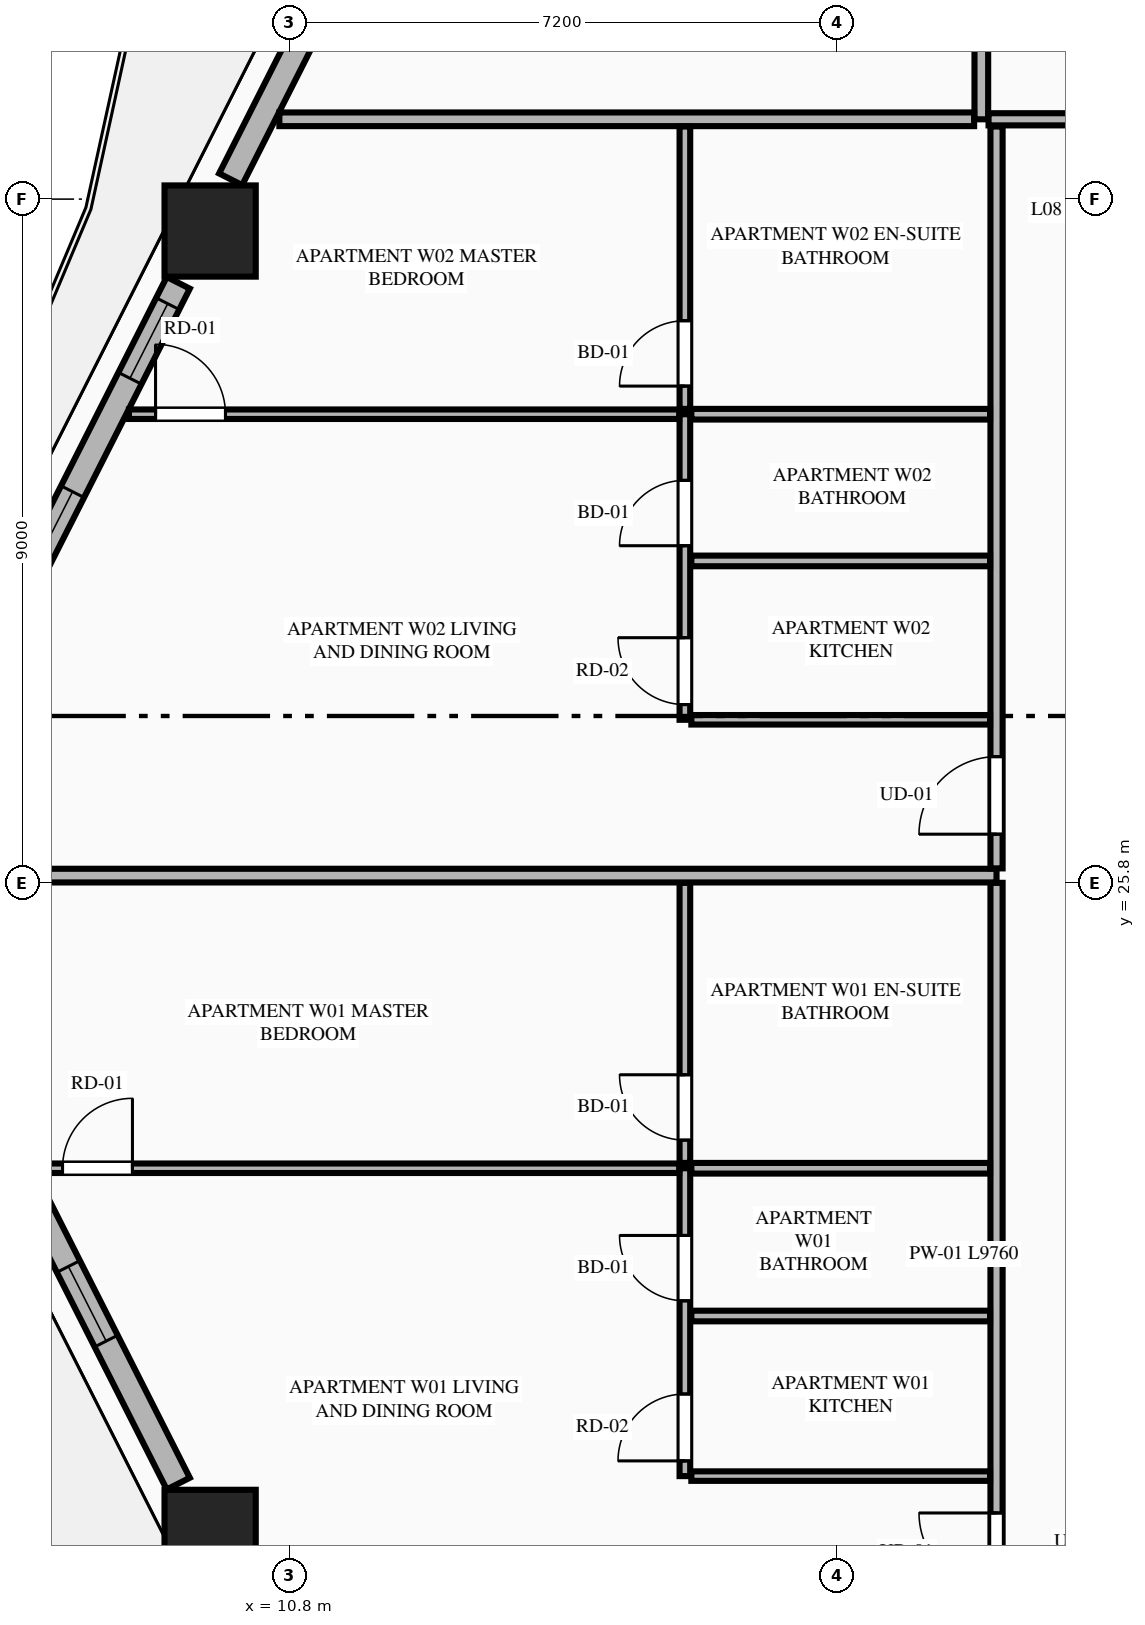
"""IFC4 building model, lengths in metres.
Left out: names, types, materials, properties, quantities, classifications, styles, units other than length and angle.
Written with IfcOpenShell. Run it as: python <this file> out.ifc"""

import sys

from ifc_helpers import new_model, si_unit, direction, frame, frame_2d, origin, origin_2d, place, context, subcontext, project, spatial, rectangle, extrude, element, fill, save


model = new_model("IFC4")
c1 = context("Model", 3, precision=1e-05, world=origin(), true_north=direction((0.0, 1.0)))
c2 = subcontext(c1, "Body", "Model", "MODEL_VIEW")
j1 = project(units=[si_unit("LENGTHUNIT", "METRE"), si_unit("PLANEANGLEUNIT", "RADIAN")], contexts=[c1])
p1 = place(None, origin())
s1 = spatial("IfcSite", under=j1, at=p1, CompositionType="ELEMENT")
p2 = place(p1, origin())
s2 = spatial("IfcBuilding", under=s1, at=p2, CompositionType="ELEMENT")
p3 = place(p2, frame((0.0, 0.0, 35.55)))
s3 = spatial("IfcBuildingStorey", under=s2, at=p3, CompositionType="ELEMENT", Elevation=35.55)
for number, where, z_axis, x_axis in (
    (1, (9.754, 34.38, 0.0), (0.0, 0.0, 1.0), (1.0, 0.0, 0.0)),
    (2, (9.754, 17.22, 0.0), (0.0, 0.0, 1.0), (1.0, 0.0, 0.0)),
):
    element("IfcColumn", number, at=place(p3, frame(where, z_axis=z_axis, x_axis=x_axis)), inside=s3, PredefinedType="COLUMN", context=c2, shape_type="SweptSolid", body=[
        extrude(rectangle(XDim=1.2, YDim=1.2, at=origin_2d()), origin(), (0.0, 0.0, 1.0), 3.55),
    ])
p4 = place(p3, frame((12.529, 40.01, 0.0), z_axis=(0.0, 0.0, 1.0), x_axis=(-0.451627137896, -0.892206774417, 0.0)))
e3 = element("IfcWall", 3, at=p4, inside=s3, PredefinedType="STANDARD", context=c2, shape_type="SweptSolid", body=[
    extrude(rectangle(XDim=5.547, YDim=0.34, at=frame_2d((2.773, 0.0))), origin(), (0.0, 0.0, 1.0), 2.787),
])
p5 = place(p4, frame((1.656, 0.0, 0.0)))
e4 = element("IfcOpeningElement", 4, at=p5, cuts=e3, PredefinedType="OPENING", context=c2, shape_type="SweptSolid", body=[
    extrude(rectangle(XDim=1.1, YDim=2.25, at=frame_2d((0.55, 1.125))), frame((0.0, 0.18, 0.0), z_axis=(0.0, -1.0, 0.0), x_axis=(1.0, 0.0, 0.0)), (0.0, 0.0, 1.0), 0.36),
])
p6 = place(p3, frame((9.335, 33.699, 0.0), z_axis=(0.0, 0.0, 1.0), x_axis=(-0.451590635984, -0.892225250422, 0.0)))
e5 = element("IfcWall", 5, at=p6, inside=s3, PredefinedType="STANDARD", context=c2, shape_type="SweptSolid", body=[
    extrude(rectangle(XDim=5.303, YDim=0.34, at=frame_2d((2.652, 0.0))), origin(), (0.0, 0.0, 1.0), 2.787),
])
p7 = place(p6, frame((0.308, 0.0, 0.75)))
e6 = element("IfcOpeningElement", 6, at=p7, cuts=e5, PredefinedType="OPENING", context=c2, shape_type="SweptSolid", body=[
    extrude(rectangle(XDim=1.1, YDim=1.887, at=frame_2d((0.55, 0.943))), frame((0.0, 0.18, 0.0), z_axis=(0.0, -1.0, 0.0), x_axis=(1.0, 0.0, 0.0)), (0.0, 0.0, 1.0), 0.36),
])
p8 = place(p6, frame((3.08, 0.0, 0.75)))
e7 = element("IfcOpeningElement", 7, at=p8, cuts=e5, PredefinedType="OPENING", context=c2, shape_type="SweptSolid", body=[
    extrude(rectangle(XDim=1.1, YDim=1.887, at=frame_2d((0.55, 0.943))), frame((0.0, 0.18, 0.0), z_axis=(0.0, -1.0, 0.0), x_axis=(1.0, 0.0, 0.0)), (0.0, 0.0, 1.0), 0.36),
])
p9 = place(p3, frame((6.94, 22.633, 0.0), z_axis=(0.0, 0.0, 1.0), x_axis=(0.451572088722, -0.892234637686, 0.0)))
e8 = element("IfcWall", 8, at=p9, inside=s3, PredefinedType="STANDARD", context=c2, shape_type="SweptSolid", body=[
    extrude(rectangle(XDim=5.304, YDim=0.34, at=frame_2d((2.652, 0.0))), origin(), (0.0, 0.0, 1.0), 2.787),
])
p10 = place(p9, frame((2.102, 0.0, 0.75)))
e9 = element("IfcOpeningElement", 9, at=p10, cuts=e8, PredefinedType="OPENING", context=c2, shape_type="SweptSolid", body=[
    extrude(rectangle(XDim=1.1, YDim=1.887, at=frame_2d((0.55, 0.943))), frame((0.0, 0.18, 0.0), z_axis=(0.0, -1.0, 0.0), x_axis=(1.0, 0.0, 0.0)), (0.0, 0.0, 1.0), 0.36),
])
p11 = place(p3, frame((19.9, 35.85, 0.0), z_axis=(0.0, 0.0, 1.0), x_axis=(0.0, 1.0, 0.0)))
e10 = element("IfcWall", 10, at=p11, inside=s3, PredefinedType="PARTITIONING", context=c2, shape_type="SweptSolid", body=[
    extrude(rectangle(XDim=13.295, YDim=0.18, at=frame_2d((6.647, 0.0))), origin(), (0.0, 0.0, 1.0), 3.33),
])
p12 = place(p3, frame((19.995, 35.85, 0.0), z_axis=(0.0, 0.0, 1.0), x_axis=(1.0, 0.0, 0.0)))
e11 = element("IfcWall", 11, at=p12, inside=s3, PredefinedType="PARTITIONING", context=c2, shape_type="SweptSolid", body=[
    extrude(rectangle(XDim=16.432, YDim=0.16, at=frame_2d((8.216, 0.0))), origin(), (0.0, 0.0, 1.0), 3.33),
])
p13 = place(p12, frame((14.577, 0.0, 0.0)))
e12 = element("IfcOpeningElement", 12, at=p13, cuts=e11, PredefinedType="OPENING", context=c2, shape_type="SweptSolid", body=[
    extrude(rectangle(XDim=1.02, YDim=2.25, at=frame_2d((0.51, 1.125))), frame((0.0, 0.09, 0.0), z_axis=(0.0, -1.0, 0.0), x_axis=(1.0, 0.0, 0.0)), (0.0, 0.0, 1.0), 0.18),
])
p14 = place(p3, frame((10.665, 35.85, 0.0), z_axis=(0.0, 0.0, 1.0), x_axis=(1.0, 0.0, 0.0)))
e13 = element("IfcWall", 13, at=p14, inside=s3, PredefinedType="PARTITIONING", context=c2, shape_type="SweptSolid", body=[
    extrude(rectangle(XDim=9.14, YDim=0.18, at=frame_2d((4.57, 0.0))), origin(), (0.0, 0.0, 1.0), 3.33),
])
p15 = place(p3, frame((20.1, 16.045, 0.0), z_axis=(0.0, 0.0, 1.0), x_axis=(0.0, 1.0, 0.0)))
e14 = element("IfcWall", 14, at=p15, inside=s3, PredefinedType="PARTITIONING", context=c2, shape_type="SweptSolid", body=[
    extrude(rectangle(XDim=9.76, YDim=0.16, at=frame_2d((4.88, 0.0))), origin(), (0.0, 0.0, 1.0), 2.7),
])
p16 = place(p15, frame((0.45, 0.0, 0.0)))
e15 = element("IfcOpeningElement", 15, at=p16, cuts=e14, PredefinedType="OPENING", context=c2, shape_type="SweptSolid", body=[
    extrude(rectangle(XDim=1.02, YDim=2.25, at=frame_2d((0.51, 1.125))), frame((0.0, 0.09, 0.0), z_axis=(0.0, -1.0, 0.0), x_axis=(1.0, 0.0, 0.0)), (0.0, 0.0, 1.0), 0.18),
])
p17 = place(p3, frame((16.085, 18.0, 0.0), z_axis=(0.0, 0.0, 1.0), x_axis=(1.0, 0.0, 0.0)))
e16 = element("IfcWall", 16, at=p17, inside=s3, PredefinedType="PARTITIONING", context=c2, shape_type="SweptSolid", body=[
    extrude(rectangle(XDim=3.93, YDim=0.125, at=frame_2d((1.965, 0.0))), origin(), (0.0, 0.0, 1.0), 2.7),
])
p18 = place(p3, frame((16.0, 18.0, 0.0), z_axis=(0.0, 0.0, 1.0), x_axis=(0.0, 1.0, 0.0)))
e17 = element("IfcWall", 17, at=p18, inside=s3, PredefinedType="PLUMBINGWALL", context=c2, shape_type="SweptSolid", body=[
    extrude(rectangle(XDim=4.05, YDim=0.14, at=frame_2d((2.025, 0.0))), origin(), (0.0, 0.0, 1.0), 3.33),
])
p19 = place(p18, frame((0.2, 0.0, 0.0)))
e18 = element("IfcOpeningElement", 18, at=p19, cuts=e17, PredefinedType="OPENING", context=c2, shape_type="SweptSolid", body=[
    extrude(rectangle(XDim=0.88, YDim=2.15, at=frame_2d((0.44, 1.075))), frame((0.0, 0.08, 0.0), z_axis=(0.0, -1.0, 0.0), x_axis=(1.0, 0.0, 0.0)), (0.0, 0.0, 1.0), 0.16),
])
p20 = place(p18, frame((2.306, 0.0, 0.0)))
e19 = element("IfcOpeningElement", 19, at=p20, cuts=e17, PredefinedType="OPENING", context=c2, shape_type="SweptSolid", body=[
    extrude(rectangle(XDim=0.86, YDim=2.1, at=frame_2d((0.43, 1.05))), frame((0.0, 0.08, 0.0), z_axis=(0.0, -1.0, 0.0), x_axis=(1.0, 0.0, 0.0)), (0.0, 0.0, 1.0), 0.16),
])
p21 = place(p3, frame((16.0, 22.12, 0.0), z_axis=(0.0, 0.0, 1.0), x_axis=(0.0, 1.0, 0.0)))
e20 = element("IfcWall", 20, at=p21, inside=s3, PredefinedType="PLUMBINGWALL", context=c2, shape_type="SweptSolid", body=[
    extrude(rectangle(XDim=3.685, YDim=0.14, at=frame_2d((1.842, 0.0))), origin(), (0.0, 0.0, 1.0), 3.33),
])
p22 = place(p21, frame((0.3, 0.0, 0.0)))
e21 = element("IfcOpeningElement", 21, at=p22, cuts=e20, PredefinedType="OPENING", context=c2, shape_type="SweptSolid", body=[
    extrude(rectangle(XDim=0.86, YDim=2.1, at=frame_2d((0.43, 1.05))), frame((0.0, 0.08, 0.0), z_axis=(0.0, -1.0, 0.0), x_axis=(1.0, 0.0, 0.0)), (0.0, 0.0, 1.0), 0.16),
])
p23 = place(p3, frame((16.085, 22.05, 0.0), z_axis=(0.0, 0.0, 1.0), x_axis=(1.0, 0.0, 0.0)))
e22 = element("IfcWall", 22, at=p23, inside=s3, PredefinedType="PLUMBINGWALL", context=c2, shape_type="SweptSolid", body=[
    extrude(rectangle(XDim=3.93, YDim=0.14, at=frame_2d((1.965, 0.0))), origin(), (0.0, 0.0, 1.0), 3.33),
])
p24 = place(p3, frame((7.462, 22.05, 0.0), z_axis=(0.0, 0.0, 1.0), x_axis=(1.0, 0.0, 0.0)))
e23 = element("IfcWall", 23, at=p24, inside=s3, PredefinedType="PARTITIONING", context=c2, shape_type="SweptSolid", body=[
    extrude(rectangle(XDim=8.463, YDim=0.125, at=frame_2d((4.231, 0.0))), origin(), (0.0, 0.0, 1.0), 3.33),
])
p25 = place(p24, frame((0.35, 0.0, 0.0)))
e24 = element("IfcOpeningElement", 24, at=p25, cuts=e23, PredefinedType="OPENING", context=c2, shape_type="SweptSolid", body=[
    extrude(rectangle(XDim=0.92, YDim=2.15, at=frame_2d((0.46, 1.075))), frame((0.0, 0.073, 0.0), z_axis=(0.0, -1.0, 0.0), x_axis=(1.0, 0.0, 0.0)), (0.0, 0.0, 1.0), 0.145),
])
p26 = place(p3, frame((16.085, 20.106, 0.0), z_axis=(0.0, 0.0, 1.0), x_axis=(1.0, 0.0, 0.0)))
e25 = element("IfcWall", 25, at=p26, inside=s3, PredefinedType="PLUMBINGWALL", context=c2, shape_type="SweptSolid", body=[
    extrude(rectangle(XDim=3.93, YDim=0.14, at=frame_2d((1.965, 0.0))), origin(), (0.0, 0.0, 1.0), 3.33),
])
p27 = place(p3, frame((6.087, 25.9, 0.0), z_axis=(0.0, 0.0, 1.0), x_axis=(1.0, 0.0, 0.0)))
e26 = element("IfcWall", 26, at=p27, inside=s3, PredefinedType="PARTITIONING", context=c2, shape_type="SweptSolid", body=[
    extrude(rectangle(XDim=14.013, YDim=0.18, at=frame_2d((7.007, 0.0))), origin(), (0.0, 0.0, 1.0), 3.33),
])
p28 = place(p3, frame((20.1, 25.995, 0.0), z_axis=(0.0, 0.0, 1.0), x_axis=(0.0, 1.0, 0.0)))
e27 = element("IfcWall", 27, at=p28, inside=s3, PredefinedType="PARTITIONING", context=c2, shape_type="SweptSolid", body=[
    extrude(rectangle(XDim=9.76, YDim=0.16, at=frame_2d((4.88, 0.0))), origin(), (0.0, 0.0, 1.0), 2.7),
])
p29 = place(p28, frame((0.45, 0.0, 0.0)))
e28 = element("IfcOpeningElement", 28, at=p29, cuts=e27, PredefinedType="OPENING", context=c2, shape_type="SweptSolid", body=[
    extrude(rectangle(XDim=1.02, YDim=2.25, at=frame_2d((0.51, 1.125))), frame((0.0, 0.09, 0.0), z_axis=(0.0, -1.0, 0.0), x_axis=(1.0, 0.0, 0.0)), (0.0, 0.0, 1.0), 0.18),
])
p30 = place(p3, frame((16.085, 27.95, 0.0), z_axis=(0.0, 0.0, 1.0), x_axis=(1.0, 0.0, 0.0)))
e29 = element("IfcWall", 29, at=p30, inside=s3, PredefinedType="PARTITIONING", context=c2, shape_type="SweptSolid", body=[
    extrude(rectangle(XDim=3.93, YDim=0.125, at=frame_2d((1.965, 0.0))), origin(), (0.0, 0.0, 1.0), 3.33),
])
p31 = place(p3, frame((16.0, 27.95, 0.0), z_axis=(0.0, 0.0, 1.0), x_axis=(0.0, 1.0, 0.0)))
e30 = element("IfcWall", 30, at=p31, inside=s3, PredefinedType="PLUMBINGWALL", context=c2, shape_type="SweptSolid", body=[
    extrude(rectangle(XDim=4.02, YDim=0.14, at=frame_2d((2.01, 0.0))), origin(), (0.0, 0.0, 1.0), 3.33),
])
p32 = place(p31, frame((0.2, 0.0, 0.0)))
e31 = element("IfcOpeningElement", 31, at=p32, cuts=e30, PredefinedType="OPENING", context=c2, shape_type="SweptSolid", body=[
    extrude(rectangle(XDim=0.88, YDim=2.15, at=frame_2d((0.44, 1.075))), frame((0.0, 0.08, 0.0), z_axis=(0.0, -1.0, 0.0), x_axis=(1.0, 0.0, 0.0)), (0.0, 0.0, 1.0), 0.16),
])
p33 = place(p31, frame((2.29, 0.0, 0.0)))
e32 = element("IfcOpeningElement", 32, at=p33, cuts=e30, PredefinedType="OPENING", context=c2, shape_type="SweptSolid", body=[
    extrude(rectangle(XDim=0.86, YDim=2.1, at=frame_2d((0.43, 1.05))), frame((0.0, 0.08, 0.0), z_axis=(0.0, -1.0, 0.0), x_axis=(1.0, 0.0, 0.0)), (0.0, 0.0, 1.0), 0.16),
])
p34 = place(p3, frame((16.0, 32.04, 0.0), z_axis=(0.0, 0.0, 1.0), x_axis=(0.0, 1.0, 0.0)))
e33 = element("IfcWall", 33, at=p34, inside=s3, PredefinedType="PLUMBINGWALL", context=c2, shape_type="SweptSolid", body=[
    extrude(rectangle(XDim=3.715, YDim=0.14, at=frame_2d((1.857, 0.0))), origin(), (0.0, 0.0, 1.0), 3.33),
])
p35 = place(p34, frame((0.3, 0.0, 0.0)))
e34 = element("IfcOpeningElement", 34, at=p35, cuts=e33, PredefinedType="OPENING", context=c2, shape_type="SweptSolid", body=[
    extrude(rectangle(XDim=0.86, YDim=2.1, at=frame_2d((0.43, 1.05))), frame((0.0, 0.08, 0.0), z_axis=(0.0, -1.0, 0.0), x_axis=(1.0, 0.0, 0.0)), (0.0, 0.0, 1.0), 0.16),
])
p36 = place(p3, frame((16.085, 31.97, 0.0), z_axis=(0.0, 0.0, 1.0), x_axis=(1.0, 0.0, 0.0)))
e35 = element("IfcWall", 35, at=p36, inside=s3, PredefinedType="PLUMBINGWALL", context=c2, shape_type="SweptSolid", body=[
    extrude(rectangle(XDim=3.93, YDim=0.14, at=frame_2d((1.965, 0.0))), origin(), (0.0, 0.0, 1.0), 3.33),
])
p37 = place(p3, frame((8.686, 31.97, 0.0), z_axis=(0.0, 0.0, 1.0), x_axis=(1.0, 0.0, 0.0)))
e36 = element("IfcWall", 36, at=p37, inside=s3, PredefinedType="PARTITIONING", context=c2, shape_type="SweptSolid", body=[
    extrude(rectangle(XDim=7.239, YDim=0.125, at=frame_2d((3.62, 0.0))), origin(), (0.0, 0.0, 1.0), 3.33),
])
p38 = place(p37, frame((0.35, 0.0, 0.0)))
e37 = element("IfcOpeningElement", 37, at=p38, cuts=e36, PredefinedType="OPENING", context=c2, shape_type="SweptSolid", body=[
    extrude(rectangle(XDim=0.92, YDim=2.15, at=frame_2d((0.46, 1.075))), frame((0.0, 0.073, 0.0), z_axis=(0.0, -1.0, 0.0), x_axis=(1.0, 0.0, 0.0)), (0.0, 0.0, 1.0), 0.145),
])
p39 = place(p3, frame((16.085, 30.04, 0.0), z_axis=(0.0, 0.0, 1.0), x_axis=(1.0, 0.0, 0.0)))
e38 = element("IfcWall", 38, at=p39, inside=s3, PredefinedType="PLUMBINGWALL", context=c2, shape_type="SweptSolid", body=[
    extrude(rectangle(XDim=3.93, YDim=0.14, at=frame_2d((1.965, 0.0))), origin(), (0.0, 0.0, 1.0), 3.33),
])
p40 = place(p7, origin())
e39 = element("IfcWindow", 39, at=p40, inside=s3, PartitioningType="SINGLE_PANEL", PredefinedType="WINDOW", context=c2, shape_type="SweptSolid", body=[
    extrude(rectangle(XDim=1.1, YDim=1.887, at=frame_2d((0.55, 0.943))), frame((0.0, 0.03, 0.0), z_axis=(0.0, -1.0, 0.0), x_axis=(1.0, 0.0, 0.0)), (0.0, 0.0, 1.0), 0.06),
])
fill(e6, e39)
p41 = place(p10, origin())
e40 = element("IfcWindow", 40, at=p41, inside=s3, PartitioningType="SINGLE_PANEL", PredefinedType="WINDOW", context=c2, shape_type="SweptSolid", body=[
    extrude(rectangle(XDim=1.1, YDim=1.887, at=frame_2d((0.55, 0.943))), frame((0.0, 0.03, 0.0), z_axis=(0.0, -1.0, 0.0), x_axis=(1.0, 0.0, 0.0)), (0.0, 0.0, 1.0), 0.06),
])
fill(e9, e40)
p42 = place(p19, origin())
e41 = element("IfcDoor", 41, at=p42, inside=s3, OperationType="SINGLE_SWING_LEFT", PredefinedType="DOOR", context=c2, shape_type="SweptSolid", body=[
    extrude(rectangle(XDim=0.88, YDim=2.15, at=frame_2d((0.44, 1.075))), frame((0.0, 0.025, 0.0), z_axis=(0.0, -1.0, 0.0), x_axis=(1.0, 0.0, 0.0)), (0.0, 0.0, 1.0), 0.05),
])
fill(e18, e41)
p43 = place(p20, origin())
e42 = element("IfcDoor", 42, at=p43, inside=s3, OperationType="SINGLE_SWING_RIGHT", PredefinedType="DOOR", context=c2, shape_type="SweptSolid", body=[
    extrude(rectangle(XDim=0.86, YDim=2.1, at=frame_2d((0.43, 1.05))), frame((0.0, 0.025, 0.0), z_axis=(0.0, -1.0, 0.0), x_axis=(1.0, 0.0, 0.0)), (0.0, 0.0, 1.0), 0.05),
])
fill(e19, e42)
p44 = place(p22, origin())
e43 = element("IfcDoor", 43, at=p44, inside=s3, OperationType="SINGLE_SWING_RIGHT", PredefinedType="DOOR", context=c2, shape_type="SweptSolid", body=[
    extrude(rectangle(XDim=0.86, YDim=2.1, at=frame_2d((0.43, 1.05))), frame((0.0, 0.025, 0.0), z_axis=(0.0, -1.0, 0.0), x_axis=(1.0, 0.0, 0.0)), (0.0, 0.0, 1.0), 0.05),
])
fill(e21, e43)
p45 = place(p16, origin())
e44 = element("IfcDoor", 44, at=p45, inside=s3, OperationType="SINGLE_SWING_RIGHT", PredefinedType="DOOR", context=c2, shape_type="SweptSolid", body=[
    extrude(rectangle(XDim=1.02, YDim=2.25, at=frame_2d((0.51, 1.125))), frame((0.0, 0.025, 0.0), z_axis=(0.0, -1.0, 0.0), x_axis=(1.0, 0.0, 0.0)), (0.0, 0.0, 1.0), 0.05),
])
fill(e15, e44)
p46 = place(p25, origin())
e45 = element("IfcDoor", 45, at=p46, inside=s3, OperationType="SINGLE_SWING_RIGHT", PredefinedType="DOOR", context=c2, shape_type="SweptSolid", body=[
    extrude(rectangle(XDim=0.92, YDim=2.15, at=frame_2d((0.46, 1.075))), frame((0.0, 0.025, 0.0), z_axis=(0.0, -1.0, 0.0), x_axis=(1.0, 0.0, 0.0)), (0.0, 0.0, 1.0), 0.05),
])
fill(e24, e45)
p47 = place(p32, origin())
e46 = element("IfcDoor", 46, at=p47, inside=s3, OperationType="SINGLE_SWING_RIGHT", PredefinedType="DOOR", context=c2, shape_type="SweptSolid", body=[
    extrude(rectangle(XDim=0.88, YDim=2.15, at=frame_2d((0.44, 1.075))), frame((0.0, 0.025, 0.0), z_axis=(0.0, -1.0, 0.0), x_axis=(1.0, 0.0, 0.0)), (0.0, 0.0, 1.0), 0.05),
])
fill(e31, e46)
p48 = place(p33, origin())
e47 = element("IfcDoor", 47, at=p48, inside=s3, OperationType="SINGLE_SWING_LEFT", PredefinedType="DOOR", context=c2, shape_type="SweptSolid", body=[
    extrude(rectangle(XDim=0.86, YDim=2.1, at=frame_2d((0.43, 1.05))), frame((0.0, 0.025, 0.0), z_axis=(0.0, -1.0, 0.0), x_axis=(1.0, 0.0, 0.0)), (0.0, 0.0, 1.0), 0.05),
])
fill(e32, e47)
p49 = place(p35, origin())
e48 = element("IfcDoor", 48, at=p49, inside=s3, OperationType="SINGLE_SWING_LEFT", PredefinedType="DOOR", context=c2, shape_type="SweptSolid", body=[
    extrude(rectangle(XDim=0.86, YDim=2.1, at=frame_2d((0.43, 1.05))), frame((0.0, 0.025, 0.0), z_axis=(0.0, -1.0, 0.0), x_axis=(1.0, 0.0, 0.0)), (0.0, 0.0, 1.0), 0.05),
])
fill(e34, e48)
p50 = place(p29, origin())
e49 = element("IfcDoor", 49, at=p50, inside=s3, OperationType="SINGLE_SWING_LEFT", PredefinedType="DOOR", context=c2, shape_type="SweptSolid", body=[
    extrude(rectangle(XDim=1.02, YDim=2.25, at=frame_2d((0.51, 1.125))), frame((0.0, 0.025, 0.0), z_axis=(0.0, -1.0, 0.0), x_axis=(1.0, 0.0, 0.0)), (0.0, 0.0, 1.0), 0.05),
])
fill(e28, e49)
p51 = place(p38, origin())
e50 = element("IfcDoor", 50, at=p51, inside=s3, OperationType="SINGLE_SWING_LEFT", PredefinedType="DOOR", context=c2, shape_type="SweptSolid", body=[
    extrude(rectangle(XDim=0.92, YDim=2.15, at=frame_2d((0.46, 1.075))), frame((0.0, 0.025, 0.0), z_axis=(0.0, -1.0, 0.0), x_axis=(1.0, 0.0, 0.0)), (0.0, 0.0, 1.0), 0.05),
])
fill(e37, e50)
p52 = place(p8, origin())
e51 = element("IfcWindow", 51, at=p52, inside=s3, PartitioningType="SINGLE_PANEL", PredefinedType="WINDOW", context=c2, shape_type="SweptSolid", body=[
    extrude(rectangle(XDim=1.1, YDim=1.887, at=frame_2d((0.55, 0.943))), frame((0.0, 0.03, 0.0), z_axis=(0.0, -1.0, 0.0), x_axis=(1.0, 0.0, 0.0)), (0.0, 0.0, 1.0), 0.06),
])
fill(e7, e51)
save(model, sys.argv[1])
